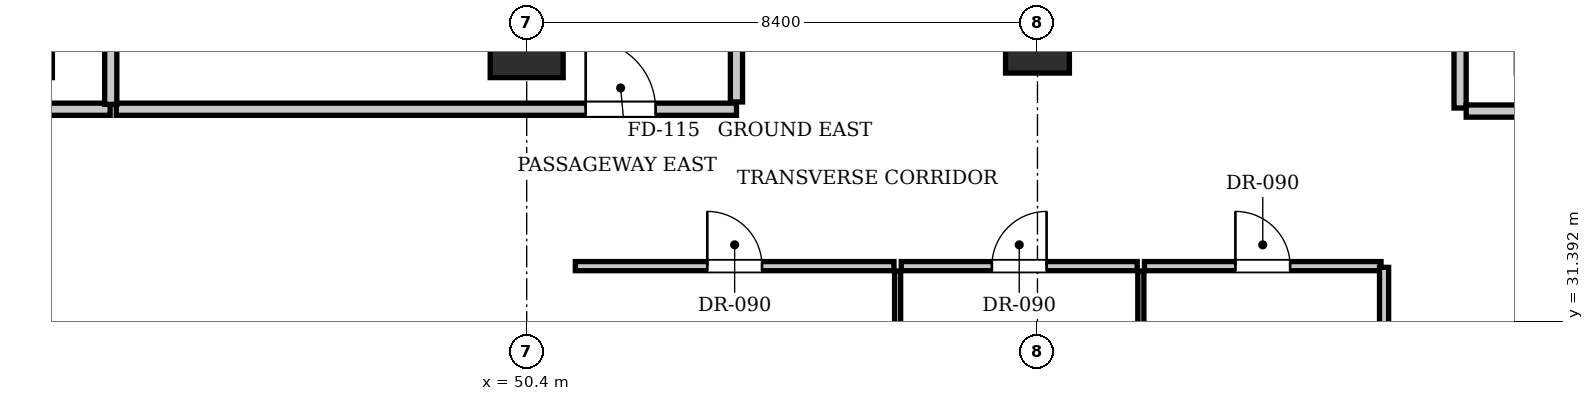
"""IFC4 building model, lengths in metres.
Left out: names, types, materials, properties, quantities, classifications, styles, units other than length and angle.
Written with IfcOpenShell. Run it as: python <this file> out.ifc"""

import sys

from ifc_helpers import new_model, si_unit, direction, frame, frame_2d, origin, origin_2d, place, context, subcontext, project, spatial, rectangle, extrude, element, fill, save


model = new_model("IFC4")
c1 = context("Model", 3, precision=1e-05, world=origin(), true_north=direction((0.0, 1.0)))
c2 = subcontext(c1, "Body", "Model", "MODEL_VIEW")
j1 = project(units=[si_unit("LENGTHUNIT", "METRE"), si_unit("PLANEANGLEUNIT", "RADIAN")], contexts=[c1])
p1 = place(None, origin())
s1 = spatial("IfcSite", under=j1, at=p1, CompositionType="ELEMENT")
p2 = place(p1, origin())
s2 = spatial("IfcBuilding", under=s1, at=p2, CompositionType="ELEMENT")
p3 = place(p2, origin())
s3 = spatial("IfcBuildingStorey", under=s2, at=p3, CompositionType="ELEMENT", Elevation=0.0)
p4 = place(p3, frame((50.4, 36.0, 0.0), z_axis=(0.0, 0.0, 1.0), x_axis=(1.0, 0.0, 0.0)))
e1 = element("IfcColumn", 1, at=p4, inside=s3, PredefinedType="COLUMN", context=c2, shape_type="SweptSolid", body=[
    extrude(rectangle(XDim=1.2, YDim=1.2, at=origin_2d()), origin(), (0.0, 0.0, 1.0), 5.6),
])
p5 = place(p3, frame((58.8, 36.0, 0.0), z_axis=(0.0, 0.0, 1.0), x_axis=(1.0, 0.0, 0.0)))
e2 = element("IfcColumn", 2, at=p5, inside=s3, PredefinedType="COLUMN", context=c2, shape_type="SweptSolid", body=[
    extrude(rectangle(XDim=1.05, YDim=1.05, at=origin_2d()), origin(), (0.0, 0.0, 1.0), 5.6),
])
p6 = place(p3, frame((43.65, 34.88, 0.0), z_axis=(0.0, 0.0, 1.0), x_axis=(1.0, 0.0, 0.0)))
e3 = element("IfcWall", 3, at=p6, inside=s3, PredefinedType="PARTITIONING", context=c2, shape_type="SweptSolid", body=[
    extrude(rectangle(XDim=10.2, YDim=0.2, at=frame_2d((5.1, 0.0))), origin(), (0.0, 0.0, 1.0), 5.32),
])
p7 = place(p6, frame((7.72, 0.0, 0.0)))
e4 = element("IfcOpeningElement", 4, at=p7, cuts=e3, PredefinedType="OPENING", context=c2, shape_type="SweptSolid", body=[
    extrude(rectangle(XDim=1.15, YDim=2.15, at=frame_2d((0.575, 1.075))), frame((0.0, 0.11, 0.0), z_axis=(0.0, -1.0, 0.0), x_axis=(1.0, 0.0, 0.0)), (0.0, 0.0, 1.0), 0.22),
])
p8 = place(p3, frame((53.85, 35.0, 0.0), z_axis=(0.0, 0.0, 1.0), x_axis=(0.0, 1.0, 0.0)))
e5 = element("IfcWall", 5, at=p8, inside=s3, PredefinedType="PARTITIONING", context=c2, shape_type="SweptSolid", body=[
    extrude(rectangle(XDim=18.7, YDim=0.2, at=frame_2d((9.35, 0.0))), origin(), (0.0, 0.0, 1.0), 5.32),
])
p9 = place(p3, frame((40.4, 34.88, 0.0), z_axis=(0.0, 0.0, 1.0), x_axis=(1.0, 0.0, 0.0)))
e6 = element("IfcWall", 6, at=p9, inside=s3, PredefinedType="PARTITIONING", context=c2, shape_type="SweptSolid", body=[
    extrude(rectangle(XDim=3.15, YDim=0.2, at=frame_2d((1.575, 0.0))), origin(), (0.0, 0.0, 1.0), 5.32),
])
p10 = place(p3, frame((43.56, 34.96, 0.0), z_axis=(0.0, 0.0, 1.0), x_axis=(0.0, 1.0, 0.0)))
e7 = element("IfcWall", 7, at=p10, inside=s3, PredefinedType="PARTITIONING", context=c2, shape_type="SweptSolid", body=[
    extrude(rectangle(XDim=3.16, YDim=0.2, at=frame_2d((1.58, 0.0))), origin(), (0.0, 0.0, 1.0), 5.32),
])
p11 = place(p10, frame((1.67, 0.0, 0.0)))
e8 = element("IfcOpeningElement", 8, at=p11, cuts=e7, PredefinedType="OPENING", context=c2, shape_type="SweptSolid", body=[
    extrude(rectangle(XDim=1.15, YDim=2.15, at=frame_2d((0.575, 1.075))), frame((0.0, 0.11, 0.0), z_axis=(0.0, -1.0, 0.0), x_axis=(1.0, 0.0, 0.0)), (0.0, 0.0, 1.0), 0.22),
])
p12 = place(p3, frame((51.2, 32.3, 0.0), z_axis=(0.0, 0.0, 1.0), x_axis=(1.0, 0.0, 0.0)))
e9 = element("IfcWall", 9, at=p12, inside=s3, PredefinedType="PARTITIONING", context=c2, shape_type="SweptSolid", body=[
    extrude(rectangle(XDim=5.24, YDim=0.15, at=frame_2d((2.62, 0.0))), origin(), (0.0, 0.0, 1.0), 5.32),
])
p13 = place(p12, frame((2.17, 0.0, 0.0)))
e10 = element("IfcOpeningElement", 10, at=p13, cuts=e9, PredefinedType="OPENING", context=c2, shape_type="SweptSolid", body=[
    extrude(rectangle(XDim=0.9, YDim=2.1, at=frame_2d((0.45, 1.05))), frame((0.0, 0.085, 0.0), z_axis=(0.0, -1.0, 0.0), x_axis=(1.0, 0.0, 0.0)), (0.0, 0.0, 1.0), 0.17),
])
p14 = place(p3, frame((56.56, 32.3, 0.0), z_axis=(0.0, 0.0, 1.0), x_axis=(1.0, 0.0, 0.0)))
e11 = element("IfcWall", 11, at=p14, inside=s3, PredefinedType="PARTITIONING", context=c2, shape_type="SweptSolid", body=[
    extrude(rectangle(XDim=3.88, YDim=0.15, at=frame_2d((1.94, 0.0))), origin(), (0.0, 0.0, 1.0), 5.32),
])
p15 = place(p14, frame((1.49, 0.0, 0.0)))
e12 = element("IfcOpeningElement", 12, at=p15, cuts=e11, PredefinedType="OPENING", context=c2, shape_type="SweptSolid", body=[
    extrude(rectangle(XDim=0.9, YDim=2.1, at=frame_2d((0.45, 1.05))), frame((0.0, 0.085, 0.0), z_axis=(0.0, -1.0, 0.0), x_axis=(1.0, 0.0, 0.0)), (0.0, 0.0, 1.0), 0.17),
])
p16 = place(p3, frame((60.56, 32.3, 0.0), z_axis=(0.0, 0.0, 1.0), x_axis=(1.0, 0.0, 0.0)))
e13 = element("IfcWall", 13, at=p16, inside=s3, PredefinedType="PARTITIONING", context=c2, shape_type="SweptSolid", body=[
    extrude(rectangle(XDim=3.89, YDim=0.15, at=frame_2d((1.945, 0.0))), origin(), (0.0, 0.0, 1.0), 5.32),
])
p17 = place(p16, frame((1.495, 0.0, 0.0)))
e14 = element("IfcOpeningElement", 14, at=p17, cuts=e13, PredefinedType="OPENING", context=c2, shape_type="SweptSolid", body=[
    extrude(rectangle(XDim=0.9, YDim=2.1, at=frame_2d((0.45, 1.05))), frame((0.0, 0.085, 0.0), z_axis=(0.0, -1.0, 0.0), x_axis=(1.0, 0.0, 0.0)), (0.0, 0.0, 1.0), 0.17),
])
for number, where, z_axis, x_axis in (
    (15, (56.5, 26.0, 0.0), (0.0, 0.0, 1.0), (0.0, 1.0, 0.0)),
    (16, (60.5, 26.0, 0.0), (0.0, 0.0, 1.0), (0.0, 1.0, 0.0)),
):
    element("IfcWall", number, at=place(p3, frame(where, z_axis=z_axis, x_axis=x_axis)), inside=s3, PredefinedType="PARTITIONING", context=c2, shape_type="SweptSolid", body=[
        extrude(rectangle(XDim=6.22, YDim=0.1, at=frame_2d((3.11, 0.0))), origin(), (0.0, 0.0, 1.0), 5.32),
    ])
p18 = place(p3, frame((64.5, 26.0, 0.0), z_axis=(0.0, 0.0, 1.0), x_axis=(0.0, 1.0, 0.0)))
e17 = element("IfcWall", 17, at=p18, inside=s3, PredefinedType="PARTITIONING", context=c2, shape_type="SweptSolid", body=[
    extrude(rectangle(XDim=6.28, YDim=0.15, at=frame_2d((3.14, 0.0))), origin(), (0.0, 0.0, 1.0), 5.32),
])
p19 = place(p3, frame((65.75, 34.9, 0.0), z_axis=(0.0, 0.0, 1.0), x_axis=(0.0, 1.0, 0.0)))
e18 = element("IfcWall", 18, at=p19, inside=s3, PredefinedType="PARTITIONING", context=c2, shape_type="SweptSolid", body=[
    extrude(rectangle(XDim=10.0, YDim=0.2, at=frame_2d((5.0, 0.0))), origin(), (0.0, 0.0, 1.0), 5.32),
])
p20 = place(p19, frame((3.5, 0.0, 0.0)))
e19 = element("IfcOpeningElement", 19, at=p20, cuts=e18, PredefinedType="OPENING", context=c2, shape_type="SweptSolid", body=[
    extrude(rectangle(XDim=2.2, YDim=2.4, at=frame_2d((1.1, 1.2))), frame((0.0, 0.11, 0.0), z_axis=(0.0, -1.0, 0.0), x_axis=(1.0, 0.0, 0.0)), (0.0, 0.0, 1.0), 0.22),
])
p21 = place(p3, frame((65.85, 34.85, 0.0), z_axis=(0.0, 0.0, 1.0), x_axis=(1.0, 0.0, 0.0)))
e20 = element("IfcWall", 20, at=p21, inside=s3, PredefinedType="PARTITIONING", context=c2, shape_type="SweptSolid", body=[
    extrude(rectangle(XDim=9.45, YDim=0.2, at=frame_2d((4.725, 0.0))), origin(), (0.0, 0.0, 1.0), 5.32),
])
p22 = place(p7, origin())
e21 = element("IfcDoor", 21, at=p22, inside=s3, OperationType="SINGLE_SWING_LEFT", PredefinedType="DOOR", context=c2, shape_type="SweptSolid", body=[
    extrude(rectangle(XDim=1.15, YDim=2.15, at=frame_2d((0.575, 1.075))), frame((0.0, 0.025, 0.0), z_axis=(0.0, -1.0, 0.0), x_axis=(1.0, 0.0, 0.0)), (0.0, 0.0, 1.0), 0.05),
])
fill(e4, e21)
p23 = place(p13, origin())
e22 = element("IfcDoor", 22, at=p23, inside=s3, OperationType="SINGLE_SWING_LEFT", PredefinedType="DOOR", context=c2, shape_type="SweptSolid", body=[
    extrude(rectangle(XDim=0.9, YDim=2.1, at=frame_2d((0.45, 1.05))), frame((0.0, 0.025, 0.0), z_axis=(0.0, -1.0, 0.0), x_axis=(1.0, 0.0, 0.0)), (0.0, 0.0, 1.0), 0.05),
])
fill(e10, e22)
p24 = place(p15, origin())
e23 = element("IfcDoor", 23, at=p24, inside=s3, OperationType="SINGLE_SWING_RIGHT", PredefinedType="DOOR", context=c2, shape_type="SweptSolid", body=[
    extrude(rectangle(XDim=0.9, YDim=2.1, at=frame_2d((0.45, 1.05))), frame((0.0, 0.025, 0.0), z_axis=(0.0, -1.0, 0.0), x_axis=(1.0, 0.0, 0.0)), (0.0, 0.0, 1.0), 0.05),
])
fill(e12, e23)
p25 = place(p17, origin())
e24 = element("IfcDoor", 24, at=p25, inside=s3, OperationType="SINGLE_SWING_LEFT", PredefinedType="DOOR", context=c2, shape_type="SweptSolid", body=[
    extrude(rectangle(XDim=0.9, YDim=2.1, at=frame_2d((0.45, 1.05))), frame((0.0, 0.025, 0.0), z_axis=(0.0, -1.0, 0.0), x_axis=(1.0, 0.0, 0.0)), (0.0, 0.0, 1.0), 0.05),
])
fill(e14, e24)
save(model, sys.argv[1])
